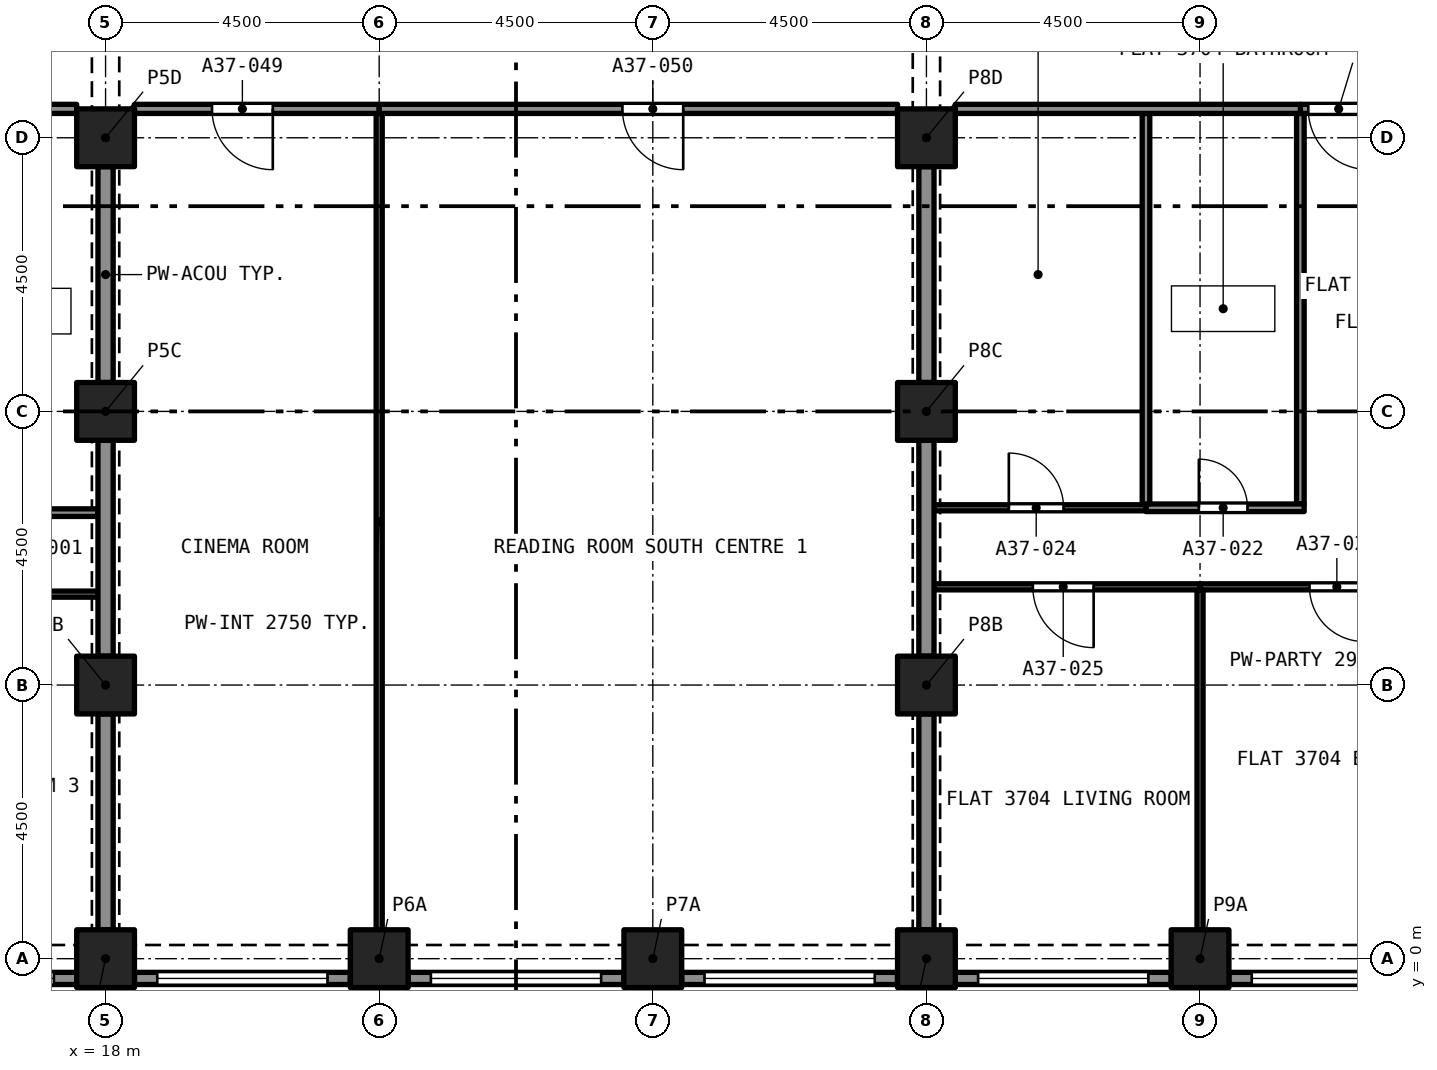
"""IFC4 building model, lengths in metres.
Left out: names, types, materials, properties, quantities, classifications, styles, units other than length and angle.
Written with IfcOpenShell. Run it as: python <this file> out.ifc"""

import sys

from ifc_helpers import new_model, si_unit, direction, frame, frame_2d, origin, origin_2d, place, context, subcontext, project, spatial, rectangle, extrude, element, fill, save


model = new_model("IFC4")
c1 = context("Model", 3, precision=1e-05, world=origin(), true_north=direction((0.0, 1.0)))
c2 = subcontext(c1, "Body", "Model", "MODEL_VIEW")
j1 = project(units=[si_unit("LENGTHUNIT", "METRE"), si_unit("PLANEANGLEUNIT", "RADIAN")], contexts=[c1])
p1 = place(None, origin())
s1 = spatial("IfcSite", under=j1, at=p1, CompositionType="ELEMENT")
p2 = place(p1, origin())
s2 = spatial("IfcBuilding", under=s1, at=p2, CompositionType="ELEMENT")
p3 = place(p2, frame((0.0, 0.0, 133.4)))
s3 = spatial("IfcBuildingStorey", under=s2, at=p3, CompositionType="ELEMENT", Elevation=133.4)
for number, where, z_axis, x_axis in (
    (1, (18.0, 0.0, 0.0), (0.0, 0.0, 1.0), (1.0, 0.0, 0.0)),
    (2, (22.5, 0.0, 0.0), (0.0, 0.0, 1.0), (1.0, 0.0, 0.0)),
    (3, (27.0, 0.0, 0.0), (0.0, 0.0, 1.0), (1.0, 0.0, 0.0)),
    (4, (31.5, 0.0, 0.0), (0.0, 0.0, 1.0), (1.0, 0.0, 0.0)),
    (5, (36.0, 0.0, 0.0), (0.0, 0.0, 1.0), (1.0, 0.0, 0.0)),
    (6, (18.0, 4.5, 0.0), (0.0, 0.0, 1.0), (1.0, 0.0, 0.0)),
    (7, (31.5, 4.5, 0.0), (0.0, 0.0, 1.0), (1.0, 0.0, 0.0)),
    (8, (18.0, 9.0, 0.0), (0.0, 0.0, 1.0), (1.0, 0.0, 0.0)),
    (9, (31.5, 9.0, 0.0), (0.0, 0.0, 1.0), (1.0, 0.0, 0.0)),
    (10, (18.0, 13.5, 0.0), (0.0, 0.0, 1.0), (1.0, 0.0, 0.0)),
    (11, (31.5, 13.5, 0.0), (0.0, 0.0, 1.0), (1.0, 0.0, 0.0)),
):
    element("IfcColumn", number, at=place(p3, frame(where, z_axis=z_axis, x_axis=x_axis)), inside=s3, PredefinedType="COLUMN", context=c2, shape_type="SweptSolid", body=[
        extrude(rectangle(XDim=0.95, YDim=0.95, at=origin_2d()), origin(), (0.0, 0.0, 1.0), 3.2),
    ])
p4 = place(p3, frame((17.525, -0.325, 0.0), z_axis=(0.0, 0.0, 1.0), x_axis=(-1.0, 0.0, 0.0)))
e12 = element("IfcWall", 12, at=p4, inside=s3, PredefinedType="SOLIDWALL", context=c2, shape_type="SweptSolid", body=[
    extrude(rectangle(XDim=3.55, YDim=0.2, at=frame_2d((1.775, 0.0))), origin(), (0.0, 0.0, 1.0), 3.2),
])
p5 = place(p4, frame((0.375, 0.0, 0.45)))
e13 = element("IfcOpeningElement", 13, at=p5, cuts=e12, PredefinedType="OPENING", context=c2, shape_type="SweptSolid", body=[
    extrude(rectangle(XDim=2.8, YDim=1.95, at=frame_2d((1.4, 0.975))), frame((0.0, 0.11, 0.0), z_axis=(0.0, -1.0, 0.0), x_axis=(1.0, 0.0, 0.0)), (0.0, 0.0, 1.0), 0.22),
])
p6 = place(p3, frame((22.025, -0.325, 0.0), z_axis=(0.0, 0.0, 1.0), x_axis=(-1.0, 0.0, 0.0)))
e14 = element("IfcWall", 14, at=p6, inside=s3, PredefinedType="SOLIDWALL", context=c2, shape_type="SweptSolid", body=[
    extrude(rectangle(XDim=3.55, YDim=0.2, at=frame_2d((1.775, 0.0))), origin(), (0.0, 0.0, 1.0), 3.2),
])
p7 = place(p6, frame((0.375, 0.0, 0.45)))
e15 = element("IfcOpeningElement", 15, at=p7, cuts=e14, PredefinedType="OPENING", context=c2, shape_type="SweptSolid", body=[
    extrude(rectangle(XDim=2.8, YDim=1.95, at=frame_2d((1.4, 0.975))), frame((0.0, 0.11, 0.0), z_axis=(0.0, -1.0, 0.0), x_axis=(1.0, 0.0, 0.0)), (0.0, 0.0, 1.0), 0.22),
])
p8 = place(p3, frame((26.525, -0.325, 0.0), z_axis=(0.0, 0.0, 1.0), x_axis=(-1.0, 0.0, 0.0)))
e16 = element("IfcWall", 16, at=p8, inside=s3, PredefinedType="SOLIDWALL", context=c2, shape_type="SweptSolid", body=[
    extrude(rectangle(XDim=3.55, YDim=0.2, at=frame_2d((1.775, 0.0))), origin(), (0.0, 0.0, 1.0), 3.2),
])
p9 = place(p8, frame((0.375, 0.0, 0.45)))
e17 = element("IfcOpeningElement", 17, at=p9, cuts=e16, PredefinedType="OPENING", context=c2, shape_type="SweptSolid", body=[
    extrude(rectangle(XDim=2.8, YDim=1.95, at=frame_2d((1.4, 0.975))), frame((0.0, 0.11, 0.0), z_axis=(0.0, -1.0, 0.0), x_axis=(1.0, 0.0, 0.0)), (0.0, 0.0, 1.0), 0.22),
])
p10 = place(p3, frame((31.025, -0.325, 0.0), z_axis=(0.0, 0.0, 1.0), x_axis=(-1.0, 0.0, 0.0)))
e18 = element("IfcWall", 18, at=p10, inside=s3, PredefinedType="SOLIDWALL", context=c2, shape_type="SweptSolid", body=[
    extrude(rectangle(XDim=3.55, YDim=0.2, at=frame_2d((1.775, 0.0))), origin(), (0.0, 0.0, 1.0), 3.2),
])
p11 = place(p10, frame((0.375, 0.0, 0.45)))
e19 = element("IfcOpeningElement", 19, at=p11, cuts=e18, PredefinedType="OPENING", context=c2, shape_type="SweptSolid", body=[
    extrude(rectangle(XDim=2.8, YDim=1.95, at=frame_2d((1.4, 0.975))), frame((0.0, 0.11, 0.0), z_axis=(0.0, -1.0, 0.0), x_axis=(1.0, 0.0, 0.0)), (0.0, 0.0, 1.0), 0.22),
])
p12 = place(p3, frame((35.525, -0.325, 0.0), z_axis=(0.0, 0.0, 1.0), x_axis=(-1.0, 0.0, 0.0)))
e20 = element("IfcWall", 20, at=p12, inside=s3, PredefinedType="SOLIDWALL", context=c2, shape_type="SweptSolid", body=[
    extrude(rectangle(XDim=3.55, YDim=0.2, at=frame_2d((1.775, 0.0))), origin(), (0.0, 0.0, 1.0), 3.2),
])
p13 = place(p12, frame((0.375, 0.0, 0.45)))
e21 = element("IfcOpeningElement", 21, at=p13, cuts=e20, PredefinedType="OPENING", context=c2, shape_type="SweptSolid", body=[
    extrude(rectangle(XDim=2.8, YDim=1.95, at=frame_2d((1.4, 0.975))), frame((0.0, 0.11, 0.0), z_axis=(0.0, -1.0, 0.0), x_axis=(1.0, 0.0, 0.0)), (0.0, 0.0, 1.0), 0.22),
])
p14 = place(p3, frame((40.025, -0.325, 0.0), z_axis=(0.0, 0.0, 1.0), x_axis=(-1.0, 0.0, 0.0)))
e22 = element("IfcWall", 22, at=p14, inside=s3, PredefinedType="SOLIDWALL", context=c2, shape_type="SweptSolid", body=[
    extrude(rectangle(XDim=3.55, YDim=0.2, at=frame_2d((1.775, 0.0))), origin(), (0.0, 0.0, 1.0), 3.2),
])
p15 = place(p14, frame((0.375, 0.0, 0.45)))
e23 = element("IfcOpeningElement", 23, at=p15, cuts=e22, PredefinedType="OPENING", context=c2, shape_type="SweptSolid", body=[
    extrude(rectangle(XDim=2.8, YDim=1.95, at=frame_2d((1.4, 0.975))), frame((0.0, 0.11, 0.0), z_axis=(0.0, -1.0, 0.0), x_axis=(1.0, 0.0, 0.0)), (0.0, 0.0, 1.0), 0.22),
])
p16 = place(p3, frame((15.163, 7.335, 0.0), z_axis=(0.0, 0.0, 1.0), x_axis=(1.0, 0.0, 0.0)))
e24 = element("IfcWall", 24, at=p16, inside=s3, PredefinedType="PARTITIONING", context=c2, shape_type="SweptSolid", body=[
    extrude(rectangle(XDim=2.712, YDim=0.125, at=frame_2d((1.356, 0.0))), origin(), (0.0, 0.0, 1.0), 2.9),
])
p17 = place(p16, frame((1.05, 0.0, 0.0)))
e25 = element("IfcOpeningElement", 25, at=p17, cuts=e24, PredefinedType="OPENING", context=c2, shape_type="SweptSolid", body=[
    extrude(rectangle(XDim=0.8, YDim=2.1, at=frame_2d((0.4, 1.05))), frame((0.0, 0.073, 0.0), z_axis=(0.0, -1.0, 0.0), x_axis=(1.0, 0.0, 0.0)), (0.0, 0.0, 1.0), 0.145),
])
p18 = place(p3, frame((18.0, 9.475, 0.0), z_axis=(0.0, 0.0, 1.0), x_axis=(0.0, 1.0, 0.0)))
e26 = element("IfcWall", 26, at=p18, inside=s3, PredefinedType="PARTITIONING", context=c2, shape_type="SweptSolid", body=[
    extrude(rectangle(XDim=3.55, YDim=0.25, at=frame_2d((1.775, 0.0))), origin(), (0.0, 0.0, 1.0), 2.38),
])
p19 = place(p3, frame((15.225, 13.975, 0.0), z_axis=(0.0, 0.0, 1.0), x_axis=(1.0, 0.0, 0.0)))
e27 = element("IfcWall", 27, at=p19, inside=s3, PredefinedType="PARTITIONING", context=c2, shape_type="SweptSolid", body=[
    extrude(rectangle(XDim=2.3, YDim=0.15, at=frame_2d((1.15, 0.0))), origin(), (0.0, 0.0, 1.0), 2.9),
])
p20 = place(p3, frame((17.875, 5.995, 0.0), z_axis=(0.0, 0.0, 1.0), x_axis=(-1.0, 0.0, 0.0)))
e28 = element("IfcWall", 28, at=p20, inside=s3, PredefinedType="PARTITIONING", context=c2, shape_type="SweptSolid", body=[
    extrude(rectangle(XDim=4.375, YDim=0.1, at=frame_2d((2.188, 0.0))), origin(), (0.0, 0.0, 1.0), 2.9),
])
p21 = place(p20, frame((1.675, 0.0, 0.0)))
e29 = element("IfcOpeningElement", 29, at=p21, cuts=e28, PredefinedType="OPENING", context=c2, shape_type="SweptSolid", body=[
    extrude(rectangle(XDim=0.9, YDim=2.1, at=frame_2d((0.45, 1.05))), frame((0.0, 0.06, 0.0), z_axis=(0.0, -1.0, 0.0), x_axis=(1.0, 0.0, 0.0)), (0.0, 0.0, 1.0), 0.12),
])
for number, where, z_axis, x_axis in (
    (30, (18.0, 4.975, 0.0), (0.0, 0.0, 1.0), (0.0, 1.0, 0.0)),
    (31, (18.0, 0.475, 0.0), (0.0, 0.0, 1.0), (0.0, 1.0, 0.0)),
):
    element("IfcWall", number, at=place(p3, frame(where, z_axis=z_axis, x_axis=x_axis)), inside=s3, PredefinedType="PARTITIONING", context=c2, shape_type="SweptSolid", body=[
        extrude(rectangle(XDim=3.55, YDim=0.25, at=frame_2d((1.775, 0.0))), origin(), (0.0, 0.0, 1.0), 2.38),
    ])
p22 = place(p3, frame((37.65, 7.478, 0.0), z_axis=(0.0, 0.0, 1.0), x_axis=(0.0, 1.0, 0.0)))
e32 = element("IfcWall", 32, at=p22, inside=s3, PredefinedType="PARTITIONING", context=c2, shape_type="SweptSolid", body=[
    extrude(rectangle(XDim=6.422, YDim=0.125, at=frame_2d((3.211, 0.0))), origin(), (0.0, 0.0, 1.0), 2.9),
])
p23 = place(p3, frame((35.111, 7.415, 0.0), z_axis=(0.0, 0.0, 1.0), x_axis=(1.0, 0.0, 0.0)))
e33 = element("IfcWall", 33, at=p23, inside=s3, PredefinedType="PARTITIONING", context=c2, shape_type="SweptSolid", body=[
    extrude(rectangle(XDim=2.602, YDim=0.125, at=frame_2d((1.301, 0.0))), origin(), (0.0, 0.0, 1.0), 2.9),
])
p24 = place(p23, frame((0.87, 0.0, 0.0)))
e34 = element("IfcOpeningElement", 34, at=p24, cuts=e33, PredefinedType="OPENING", context=c2, shape_type="SweptSolid", body=[
    extrude(rectangle(XDim=0.8, YDim=2.1, at=frame_2d((0.4, 1.05))), frame((0.0, 0.073, 0.0), z_axis=(0.0, -1.0, 0.0), x_axis=(1.0, 0.0, 0.0)), (0.0, 0.0, 1.0), 0.145),
])
p25 = place(p3, frame((35.111, 7.478, 0.0), z_axis=(0.0, 0.0, 1.0), x_axis=(0.0, 1.0, 0.0)))
e35 = element("IfcWall", 35, at=p25, inside=s3, PredefinedType="PARTITIONING", context=c2, shape_type="SweptSolid", body=[
    extrude(rectangle(XDim=6.422, YDim=0.125, at=frame_2d((3.211, 0.0))), origin(), (0.0, 0.0, 1.0), 2.9),
])
p26 = place(p3, frame((40.4, 6.115, 0.0), z_axis=(0.0, 0.0, 1.0), x_axis=(-1.0, 0.0, 0.0)))
e36 = element("IfcWall", 36, at=p26, inside=s3, PredefinedType="PARTITIONING", context=c2, shape_type="SweptSolid", body=[
    extrude(rectangle(XDim=4.4, YDim=0.1, at=frame_2d((2.2, 0.0))), origin(), (0.0, 0.0, 1.0), 2.9),
])
p27 = place(p26, frame((1.7, 0.0, 0.0)))
e37 = element("IfcOpeningElement", 37, at=p27, cuts=e36, PredefinedType="OPENING", context=c2, shape_type="SweptSolid", body=[
    extrude(rectangle(XDim=0.9, YDim=2.1, at=frame_2d((0.45, 1.05))), frame((0.0, 0.06, 0.0), z_axis=(0.0, -1.0, 0.0), x_axis=(1.0, 0.0, 0.0)), (0.0, 0.0, 1.0), 0.12),
])
p28 = place(p3, frame((36.0, 0.475, 0.0), z_axis=(0.0, 0.0, 1.0), x_axis=(0.0, 1.0, 0.0)))
e38 = element("IfcWall", 38, at=p28, inside=s3, PredefinedType="PARTITIONING", context=c2, shape_type="SweptSolid", body=[
    extrude(rectangle(XDim=5.59, YDim=0.1, at=frame_2d((2.795, 0.0))), origin(), (0.0, 0.0, 1.0), 2.9),
])
p29 = place(p3, frame((31.625, 7.415, 0.0), z_axis=(0.0, 0.0, 1.0), x_axis=(1.0, 0.0, 0.0)))
e39 = element("IfcWall", 39, at=p29, inside=s3, PredefinedType="PARTITIONING", context=c2, shape_type="SweptSolid", body=[
    extrude(rectangle(XDim=3.486, YDim=0.1, at=frame_2d((1.743, 0.0))), origin(), (0.0, 0.0, 1.0), 2.9),
])
p30 = place(p29, frame((1.23, 0.0, 0.0)))
e40 = element("IfcOpeningElement", 40, at=p30, cuts=e39, PredefinedType="OPENING", context=c2, shape_type="SweptSolid", body=[
    extrude(rectangle(XDim=0.9, YDim=2.1, at=frame_2d((0.45, 1.05))), frame((0.0, 0.06, 0.0), z_axis=(0.0, -1.0, 0.0), x_axis=(1.0, 0.0, 0.0)), (0.0, 0.0, 1.0), 0.12),
])
p31 = place(p3, frame((36.0, 6.115, 0.0), z_axis=(0.0, 0.0, 1.0), x_axis=(-1.0, 0.0, 0.0)))
e41 = element("IfcWall", 41, at=p31, inside=s3, PredefinedType="PARTITIONING", context=c2, shape_type="SweptSolid", body=[
    extrude(rectangle(XDim=4.375, YDim=0.1, at=frame_2d((2.188, 0.0))), origin(), (0.0, 0.0, 1.0), 2.9),
])
p32 = place(p31, frame((1.75, 0.0, 0.0)))
e42 = element("IfcOpeningElement", 42, at=p32, cuts=e41, PredefinedType="OPENING", context=c2, shape_type="SweptSolid", body=[
    extrude(rectangle(XDim=1.0, YDim=2.1, at=frame_2d((0.5, 1.05))), frame((0.0, 0.06, 0.0), z_axis=(0.0, -1.0, 0.0), x_axis=(1.0, 0.0, 0.0)), (0.0, 0.0, 1.0), 0.12),
])
p33 = place(p3, frame((40.5, 13.975, 0.0), z_axis=(0.0, 0.0, 1.0), x_axis=(-1.0, 0.0, 0.0)))
e43 = element("IfcWall", 43, at=p33, inside=s3, PredefinedType="PARTITIONING", context=c2, shape_type="SweptSolid", body=[
    extrude(rectangle(XDim=2.85, YDim=0.15, at=frame_2d((1.425, 0.0))), origin(), (0.0, 0.0, 1.0), 2.9),
])
p34 = place(p33, frame((1.72, 0.0, 0.0)))
e44 = element("IfcOpeningElement", 44, at=p34, cuts=e43, PredefinedType="OPENING", context=c2, shape_type="SweptSolid", body=[
    extrude(rectangle(XDim=1.0, YDim=2.1, at=frame_2d((0.5, 1.05))), frame((0.0, 0.085, 0.0), z_axis=(0.0, -1.0, 0.0), x_axis=(1.0, 0.0, 0.0)), (0.0, 0.0, 1.0), 0.17),
])
p35 = place(p3, frame((31.5, 9.475, 0.0), z_axis=(0.0, 0.0, 1.0), x_axis=(0.0, 1.0, 0.0)))
e45 = element("IfcWall", 45, at=p35, inside=s3, PredefinedType="PARTITIONING", context=c2, shape_type="SweptSolid", body=[
    extrude(rectangle(XDim=3.55, YDim=0.25, at=frame_2d((1.775, 0.0))), origin(), (0.0, 0.0, 1.0), 2.38),
])
p36 = place(p3, frame((31.975, 13.975, 0.0), z_axis=(0.0, 0.0, 1.0), x_axis=(1.0, 0.0, 0.0)))
e46 = element("IfcWall", 46, at=p36, inside=s3, PredefinedType="PARTITIONING", context=c2, shape_type="SweptSolid", body=[
    extrude(rectangle(XDim=5.675, YDim=0.15, at=frame_2d((2.837, 0.0))), origin(), (0.0, 0.0, 1.0), 2.9),
])
for number, where, z_axis, x_axis in (
    (47, (31.5, 0.475, 0.0), (0.0, 0.0, 1.0), (0.0, 1.0, 0.0)),
    (48, (31.5, 4.975, 0.0), (0.0, 0.0, 1.0), (0.0, 1.0, 0.0)),
):
    element("IfcWall", number, at=place(p3, frame(where, z_axis=z_axis, x_axis=x_axis)), inside=s3, PredefinedType="PARTITIONING", context=c2, shape_type="SweptSolid", body=[
        extrude(rectangle(XDim=3.55, YDim=0.25, at=frame_2d((1.775, 0.0))), origin(), (0.0, 0.0, 1.0), 2.38),
    ])
p37 = place(p3, frame((22.5, 0.475, 0.0), z_axis=(0.0, 0.0, 1.0), x_axis=(0.0, 1.0, 0.0)))
e49 = element("IfcWall", 49, at=p37, inside=s3, PredefinedType="PARTITIONING", context=c2, shape_type="SweptSolid", body=[
    extrude(rectangle(XDim=13.425, YDim=0.1, at=frame_2d((6.712, 0.0))), origin(), (0.0, 0.0, 1.0), 2.75),
])
p38 = place(p3, frame((22.5, 13.975, 0.0), z_axis=(0.0, 0.0, 1.0), x_axis=(-1.0, 0.0, 0.0)))
e50 = element("IfcWall", 50, at=p38, inside=s3, PredefinedType="PARTITIONING", context=c2, shape_type="SweptSolid", body=[
    extrude(rectangle(XDim=4.025, YDim=0.15, at=frame_2d((2.012, 0.0))), origin(), (0.0, 0.0, 1.0), 2.75),
])
p39 = place(p38, frame((1.75, 0.0, 0.0)))
e51 = element("IfcOpeningElement", 51, at=p39, cuts=e50, PredefinedType="OPENING", context=c2, shape_type="SweptSolid", body=[
    extrude(rectangle(XDim=1.0, YDim=2.1, at=frame_2d((0.5, 1.05))), frame((0.0, 0.085, 0.0), z_axis=(0.0, -1.0, 0.0), x_axis=(1.0, 0.0, 0.0)), (0.0, 0.0, 1.0), 0.17),
])
p40 = place(p3, frame((31.025, 13.975, 0.0), z_axis=(0.0, 0.0, 1.0), x_axis=(-1.0, 0.0, 0.0)))
e52 = element("IfcWall", 52, at=p40, inside=s3, PredefinedType="PARTITIONING", context=c2, shape_type="SweptSolid", body=[
    extrude(rectangle(XDim=8.525, YDim=0.15, at=frame_2d((4.262, 0.0))), origin(), (0.0, 0.0, 1.0), 2.75),
])
p41 = place(p40, frame((3.525, 0.0, 0.0)))
e53 = element("IfcOpeningElement", 53, at=p41, cuts=e52, PredefinedType="OPENING", context=c2, shape_type="SweptSolid", body=[
    extrude(rectangle(XDim=1.0, YDim=2.1, at=frame_2d((0.5, 1.05))), frame((0.0, 0.085, 0.0), z_axis=(0.0, -1.0, 0.0), x_axis=(1.0, 0.0, 0.0)), (0.0, 0.0, 1.0), 0.17),
])
p42 = place(p5, origin())
e54 = element("IfcWindow", 54, at=p42, inside=s3, PartitioningType="SINGLE_PANEL", PredefinedType="WINDOW", context=c2, shape_type="SweptSolid", body=[
    extrude(rectangle(XDim=2.8, YDim=1.95, at=frame_2d((1.4, 0.975))), frame((0.0, 0.03, 0.0), z_axis=(0.0, -1.0, 0.0), x_axis=(1.0, 0.0, 0.0)), (0.0, 0.0, 1.0), 0.06),
])
fill(e13, e54)
p43 = place(p7, origin())
e55 = element("IfcWindow", 55, at=p43, inside=s3, PartitioningType="SINGLE_PANEL", PredefinedType="WINDOW", context=c2, shape_type="SweptSolid", body=[
    extrude(rectangle(XDim=2.8, YDim=1.95, at=frame_2d((1.4, 0.975))), frame((0.0, 0.03, 0.0), z_axis=(0.0, -1.0, 0.0), x_axis=(1.0, 0.0, 0.0)), (0.0, 0.0, 1.0), 0.06),
])
fill(e15, e55)
p44 = place(p9, origin())
e56 = element("IfcWindow", 56, at=p44, inside=s3, PartitioningType="SINGLE_PANEL", PredefinedType="WINDOW", context=c2, shape_type="SweptSolid", body=[
    extrude(rectangle(XDim=2.8, YDim=1.95, at=frame_2d((1.4, 0.975))), frame((0.0, 0.03, 0.0), z_axis=(0.0, -1.0, 0.0), x_axis=(1.0, 0.0, 0.0)), (0.0, 0.0, 1.0), 0.06),
])
fill(e17, e56)
p45 = place(p11, origin())
e57 = element("IfcWindow", 57, at=p45, inside=s3, PartitioningType="SINGLE_PANEL", PredefinedType="WINDOW", context=c2, shape_type="SweptSolid", body=[
    extrude(rectangle(XDim=2.8, YDim=1.95, at=frame_2d((1.4, 0.975))), frame((0.0, 0.03, 0.0), z_axis=(0.0, -1.0, 0.0), x_axis=(1.0, 0.0, 0.0)), (0.0, 0.0, 1.0), 0.06),
])
fill(e19, e57)
p46 = place(p13, origin())
e58 = element("IfcWindow", 58, at=p46, inside=s3, PartitioningType="SINGLE_PANEL", PredefinedType="WINDOW", context=c2, shape_type="SweptSolid", body=[
    extrude(rectangle(XDim=2.8, YDim=1.95, at=frame_2d((1.4, 0.975))), frame((0.0, 0.03, 0.0), z_axis=(0.0, -1.0, 0.0), x_axis=(1.0, 0.0, 0.0)), (0.0, 0.0, 1.0), 0.06),
])
fill(e21, e58)
p47 = place(p15, origin())
e59 = element("IfcWindow", 59, at=p47, inside=s3, PartitioningType="SINGLE_PANEL", PredefinedType="WINDOW", context=c2, shape_type="SweptSolid", body=[
    extrude(rectangle(XDim=2.8, YDim=1.95, at=frame_2d((1.4, 0.975))), frame((0.0, 0.03, 0.0), z_axis=(0.0, -1.0, 0.0), x_axis=(1.0, 0.0, 0.0)), (0.0, 0.0, 1.0), 0.06),
])
fill(e23, e59)
p48 = place(p24, origin())
e60 = element("IfcDoor", 60, at=p48, inside=s3, OperationType="SINGLE_SWING_LEFT", PredefinedType="DOOR", context=c2, shape_type="SweptSolid", body=[
    extrude(rectangle(XDim=0.8, YDim=2.1, at=frame_2d((0.4, 1.05))), frame((0.0, 0.025, 0.0), z_axis=(0.0, -1.0, 0.0), x_axis=(1.0, 0.0, 0.0)), (0.0, 0.0, 1.0), 0.05),
])
fill(e34, e60)
p49 = place(p27, origin())
e61 = element("IfcDoor", 61, at=p49, inside=s3, OperationType="SINGLE_SWING_LEFT", PredefinedType="DOOR", context=c2, shape_type="SweptSolid", body=[
    extrude(rectangle(XDim=0.9, YDim=2.1, at=frame_2d((0.45, 1.05))), frame((0.0, 0.025, 0.0), z_axis=(0.0, -1.0, 0.0), x_axis=(1.0, 0.0, 0.0)), (0.0, 0.0, 1.0), 0.05),
])
fill(e37, e61)
p50 = place(p30, origin())
e62 = element("IfcDoor", 62, at=p50, inside=s3, OperationType="SINGLE_SWING_LEFT", PredefinedType="DOOR", context=c2, shape_type="SweptSolid", body=[
    extrude(rectangle(XDim=0.9, YDim=2.1, at=frame_2d((0.45, 1.05))), frame((0.0, 0.025, 0.0), z_axis=(0.0, -1.0, 0.0), x_axis=(1.0, 0.0, 0.0)), (0.0, 0.0, 1.0), 0.05),
])
fill(e40, e62)
p51 = place(p32, origin())
e63 = element("IfcDoor", 63, at=p51, inside=s3, OperationType="SINGLE_SWING_RIGHT", PredefinedType="DOOR", context=c2, shape_type="SweptSolid", body=[
    extrude(rectangle(XDim=1.0, YDim=2.1, at=frame_2d((0.5, 1.05))), frame((0.0, 0.025, 0.0), z_axis=(0.0, -1.0, 0.0), x_axis=(1.0, 0.0, 0.0)), (0.0, 0.0, 1.0), 0.05),
])
fill(e42, e63)
p52 = place(p34, origin())
e64 = element("IfcDoor", 64, at=p52, inside=s3, OperationType="SINGLE_SWING_RIGHT", PredefinedType="DOOR", context=c2, shape_type="SweptSolid", body=[
    extrude(rectangle(XDim=1.0, YDim=2.1, at=frame_2d((0.5, 1.05))), frame((0.0, 0.025, 0.0), z_axis=(0.0, -1.0, 0.0), x_axis=(1.0, 0.0, 0.0)), (0.0, 0.0, 1.0), 0.05),
])
fill(e44, e64)
p53 = place(p39, origin())
e65 = element("IfcDoor", 65, at=p53, inside=s3, OperationType="SINGLE_SWING_RIGHT", PredefinedType="DOOR", context=c2, shape_type="SweptSolid", body=[
    extrude(rectangle(XDim=1.0, YDim=2.1, at=frame_2d((0.5, 1.05))), frame((0.0, 0.025, 0.0), z_axis=(0.0, -1.0, 0.0), x_axis=(1.0, 0.0, 0.0)), (0.0, 0.0, 1.0), 0.05),
])
fill(e51, e65)
p54 = place(p41, origin())
e66 = element("IfcDoor", 66, at=p54, inside=s3, OperationType="SINGLE_SWING_LEFT", PredefinedType="DOOR", context=c2, shape_type="SweptSolid", body=[
    extrude(rectangle(XDim=1.0, YDim=2.1, at=frame_2d((0.5, 1.05))), frame((0.0, 0.025, 0.0), z_axis=(0.0, -1.0, 0.0), x_axis=(1.0, 0.0, 0.0)), (0.0, 0.0, 1.0), 0.05),
])
fill(e53, e66)
save(model, sys.argv[1])
